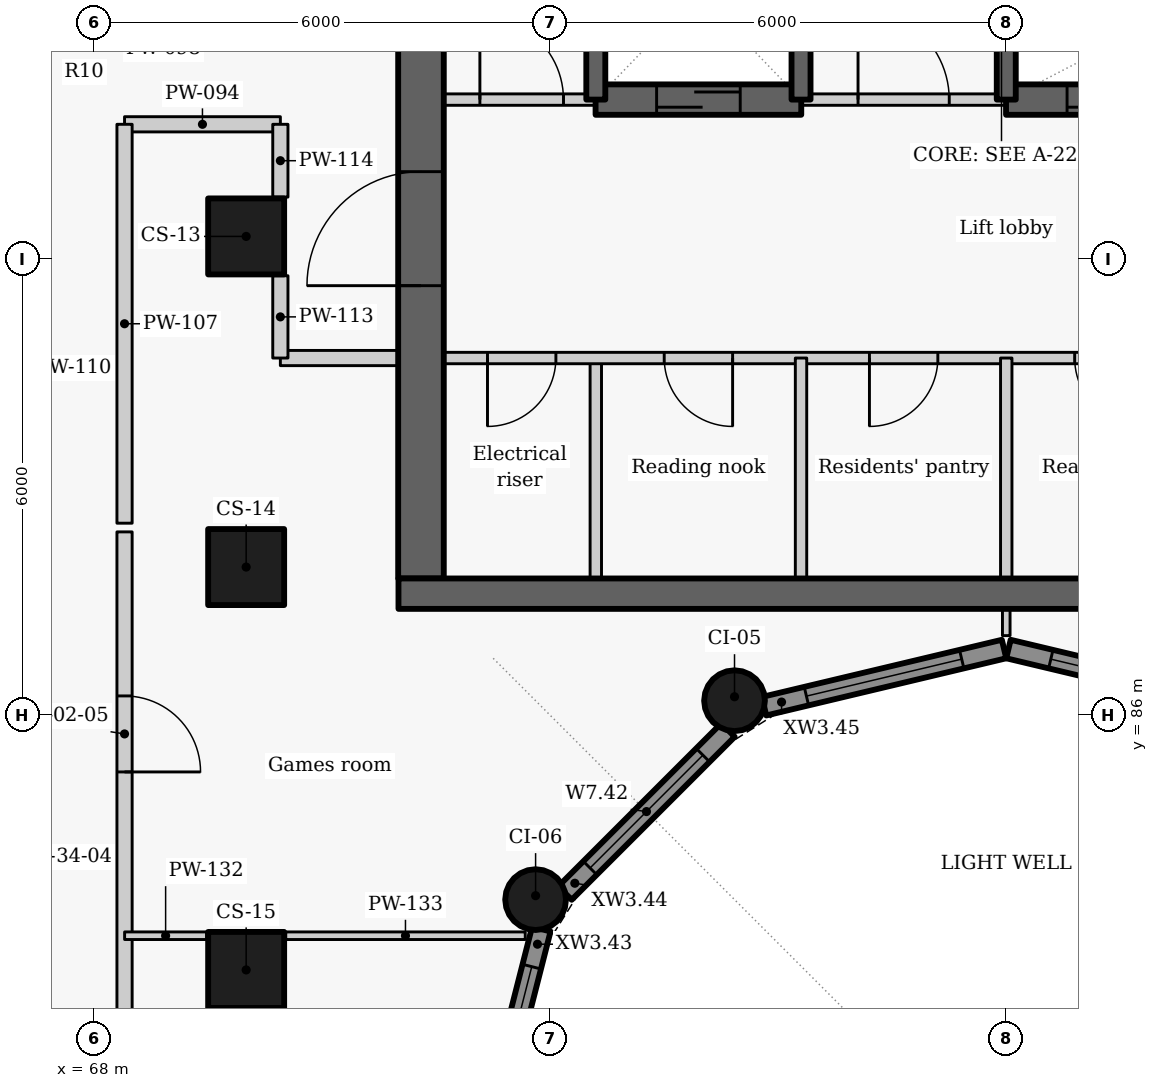
"""IFC4 building model, lengths in metres.
Left out: names, types, materials, properties, quantities, classifications, styles, units other than length and angle.
Written with IfcOpenShell. Run it as: python <this file> out.ifc"""

import sys

from ifc_helpers import new_model, si_unit, direction, frame, frame_2d, origin, origin_2d, place, context, subcontext, project, spatial, rectangle, circle, extrude, element, fill, save


model = new_model("IFC4")
c1 = context("Model", 3, precision=1e-05, world=origin(), true_north=direction((0.0, 1.0)))
c2 = subcontext(c1, "Body", "Model", "MODEL_VIEW")
j1 = project(units=[si_unit("LENGTHUNIT", "METRE"), si_unit("PLANEANGLEUNIT", "RADIAN")], contexts=[c1])
p1 = place(None, origin())
s1 = spatial("IfcSite", under=j1, at=p1, CompositionType="ELEMENT")
p2 = place(p1, origin())
s2 = spatial("IfcBuilding", under=s1, at=p2, CompositionType="ELEMENT")
p3 = place(p2, frame((0.0, 0.0, 166.8)))
s3 = spatial("IfcBuildingStorey", under=s2, at=p3, CompositionType="ELEMENT", Elevation=166.8)
for number, where, z_axis, x_axis in (
    (1, (70.0, 92.3, 0.0), (0.0, 0.0, 1.0), (0.0, -1.0, 0.0)),
    (2, (70.0, 87.95, 0.0), (0.0, 0.0, 1.0), (0.0, -1.0, 0.0)),
    (3, (70.0, 82.65, 0.0), (0.0, 0.0, 1.0), (0.0, -1.0, 0.0)),
):
    element("IfcColumn", number, at=place(p3, frame(where, z_axis=z_axis, x_axis=x_axis)), inside=s3, PredefinedType="COLUMN", context=c2, shape_type="SweptSolid", body=[
        extrude(rectangle(XDim=1.0, YDim=1.0, at=origin_2d()), origin(), (0.0, 0.0, 1.0), 3.3),
    ])
for number, where, z_axis, x_axis in (
    (4, (76.425, 86.192, 0.0), (0.0, 0.0, 1.0), (-0.866, -0.5, 0.0)),
    (5, (73.808, 83.575, 0.0), (0.0, 0.0, 1.0), (-0.5, -0.866, 0.0)),
):
    element("IfcColumn", number, at=place(p3, frame(where, z_axis=z_axis, x_axis=x_axis)), inside=s3, PredefinedType="COLUMN", context=c2, shape_type="SweptSolid", body=[
        extrude(circle(Radius=0.4, at=origin_2d()), origin(), (0.0, 0.0, 1.0), 3.3),
    ])
p4 = place(p3, frame((73.14, 80.27, 0.0), z_axis=(0.0, 0.0, 1.0), x_axis=(0.247055971283, 0.969001211069, 0.0)))
e6 = element("IfcWall", 6, at=p4, inside=s3, PredefinedType="SOLIDWALL", context=c2, shape_type="SweptSolid", body=[
    extrude(rectangle(XDim=3.01, YDim=0.25, at=frame_2d((1.505, 0.0))), origin(), (0.0, 0.0, 1.0), 2.05),
])
p5 = place(p4, frame((0.401, 0.0, 0.9)))
e7 = element("IfcOpeningElement", 7, at=p5, cuts=e6, PredefinedType="OPENING", context=c2, shape_type="SweptSolid", body=[
    extrude(rectangle(XDim=2.1, YDim=1.1, at=frame_2d((1.05, 0.55))), frame((0.0, 0.135, 0.0), z_axis=(0.0, -1.0, 0.0), x_axis=(1.0, 0.0, 0.0)), (0.0, 0.0, 1.0), 0.27),
])
p6 = place(p3, frame((74.194, 83.661, 0.0), z_axis=(0.0, 0.0, 1.0), x_axis=(0.707106781187, 0.707106781187, 0.0)))
e8 = element("IfcWall", 8, at=p6, inside=s3, PredefinedType="SOLIDWALL", context=c2, shape_type="SweptSolid", body=[
    extrude(rectangle(XDim=3.033, YDim=0.25, at=frame_2d((1.517, 0.0))), origin(), (0.0, 0.0, 1.0), 2.05),
])
p7 = place(p6, frame((0.467, 0.0, 0.9)))
e9 = element("IfcOpeningElement", 9, at=p7, cuts=e8, PredefinedType="OPENING", context=c2, shape_type="SweptSolid", body=[
    extrude(rectangle(XDim=2.1, YDim=1.1, at=frame_2d((1.05, 0.55))), frame((0.0, 0.135, 0.0), z_axis=(0.0, -1.0, 0.0), x_axis=(1.0, 0.0, 0.0)), (0.0, 0.0, 1.0), 0.27),
])
p8 = place(p3, frame((76.814, 86.119, 0.0), z_axis=(0.0, 0.0, 1.0), x_axis=(0.972773113459, 0.231759508395, 0.0)))
e10 = element("IfcWall", 10, at=p8, inside=s3, PredefinedType="SOLIDWALL", context=c2, shape_type="SweptSolid", body=[
    extrude(rectangle(XDim=3.246, YDim=0.25, at=frame_2d((1.623, 0.0))), origin(), (0.0, 0.0, 1.0), 2.05),
])
p9 = place(p8, frame((0.573, 0.0, 0.9)))
e11 = element("IfcOpeningElement", 11, at=p9, cuts=e10, PredefinedType="OPENING", context=c2, shape_type="SweptSolid", body=[
    extrude(rectangle(XDim=2.1, YDim=1.1, at=frame_2d((1.05, 0.55))), frame((0.0, 0.135, 0.0), z_axis=(0.0, -1.0, 0.0), x_axis=(1.0, 0.0, 0.0)), (0.0, 0.0, 1.0), 0.27),
])
p10 = place(p3, frame((80.029, 86.872, 0.0), z_axis=(0.0, 0.0, 1.0), x_axis=(0.972773113459, -0.231759508395, 0.0)))
e12 = element("IfcWall", 12, at=p10, inside=s3, PredefinedType="SOLIDWALL", context=c2, shape_type="SweptSolid", body=[
    extrude(rectangle(XDim=3.246, YDim=0.25, at=frame_2d((1.623, 0.0))), origin(), (0.0, 0.0, 1.0), 2.05),
])
p11 = place(p10, frame((0.573, 0.0, 0.9)))
e13 = element("IfcOpeningElement", 13, at=p11, cuts=e12, PredefinedType="OPENING", context=c2, shape_type="SweptSolid", body=[
    extrude(rectangle(XDim=2.1, YDim=1.1, at=frame_2d((1.05, 0.55))), frame((0.0, 0.135, 0.0), z_axis=(0.0, -1.0, 0.0), x_axis=(1.0, 0.0, 0.0)), (0.0, 0.0, 1.0), 0.27),
])
p12 = place(p3, frame((74.6, 87.8, 0.0), z_axis=(0.0, 0.0, 1.0), x_axis=(0.0, 1.0, 0.0)))
e14 = element("IfcWall", 14, at=p12, inside=s3, PredefinedType="PARTITIONING", context=c2, shape_type="SweptSolid", body=[
    extrude(rectangle(XDim=2.9, YDim=0.15, at=frame_2d((1.45, 0.0))), origin(), (0.0, 0.0, 1.0), 2.95),
])
p13 = place(p3, frame((85.4, 90.7, 0.0), z_axis=(0.0, 0.0, 1.0), x_axis=(-1.0, 0.0, 0.0)))
e15 = element("IfcWall", 15, at=p13, inside=s3, PredefinedType="PARTITIONING", context=c2, shape_type="SweptSolid", body=[
    extrude(rectangle(XDim=13.4, YDim=0.15, at=frame_2d((6.7, 0.0))), origin(), (0.0, 0.0, 1.0), 2.95),
])
p14 = place(p13, frame((11.325, 0.0, 0.0)))
e16 = element("IfcOpeningElement", 16, at=p14, cuts=e15, PredefinedType="OPENING", context=c2, shape_type="SweptSolid", body=[
    extrude(rectangle(XDim=0.9, YDim=2.1, at=frame_2d((0.45, 1.05))), frame((0.0, 0.085, 0.0), z_axis=(0.0, -1.0, 0.0), x_axis=(1.0, 0.0, 0.0)), (0.0, 0.0, 1.0), 0.17),
])
p15 = place(p13, frame((9.0, 0.0, 0.0)))
e17 = element("IfcOpeningElement", 17, at=p15, cuts=e15, PredefinedType="OPENING", context=c2, shape_type="SweptSolid", body=[
    extrude(rectangle(XDim=0.9, YDim=2.1, at=frame_2d((0.45, 1.05))), frame((0.0, 0.085, 0.0), z_axis=(0.0, -1.0, 0.0), x_axis=(1.0, 0.0, 0.0)), (0.0, 0.0, 1.0), 0.17),
])
p16 = place(p13, frame((6.3, 0.0, 0.0)))
e18 = element("IfcOpeningElement", 18, at=p16, cuts=e15, PredefinedType="OPENING", context=c2, shape_type="SweptSolid", body=[
    extrude(rectangle(XDim=0.9, YDim=2.1, at=frame_2d((0.45, 1.05))), frame((0.0, 0.085, 0.0), z_axis=(0.0, -1.0, 0.0), x_axis=(1.0, 0.0, 0.0)), (0.0, 0.0, 1.0), 0.17),
])
p17 = place(p13, frame((3.6, 0.0, 0.0)))
e19 = element("IfcOpeningElement", 19, at=p17, cuts=e15, PredefinedType="OPENING", context=c2, shape_type="SweptSolid", body=[
    extrude(rectangle(XDim=0.9, YDim=2.1, at=frame_2d((0.45, 1.05))), frame((0.0, 0.085, 0.0), z_axis=(0.0, -1.0, 0.0), x_axis=(1.0, 0.0, 0.0)), (0.0, 0.0, 1.0), 0.17),
])
p18 = place(p13, frame((0.9, 0.0, 0.0)))
e20 = element("IfcOpeningElement", 20, at=p18, cuts=e15, PredefinedType="OPENING", context=c2, shape_type="SweptSolid", body=[
    extrude(rectangle(XDim=0.9, YDim=2.1, at=frame_2d((0.45, 1.05))), frame((0.0, 0.085, 0.0), z_axis=(0.0, -1.0, 0.0), x_axis=(1.0, 0.0, 0.0)), (0.0, 0.0, 1.0), 0.17),
])
p19 = place(p3, frame((72.3, 87.8, -0.275), z_axis=(0.0, 0.0, 1.0), x_axis=(0.0, 1.0, 0.0)))
e21 = element("IfcWall", 21, at=p19, inside=s3, PredefinedType="SHEAR", context=c2, shape_type="SweptSolid", body=[
    extrude(rectangle(XDim=9.1, YDim=0.6, at=frame_2d((4.55, 0.0))), origin(), (0.0, 0.0, 1.0), 3.225),
])
p20 = place(p19, frame((3.852, 0.0, 0.275)))
e22 = element("IfcOpeningElement", 22, at=p20, cuts=e21, PredefinedType="OPENING", context=c2, shape_type="SweptSolid", body=[
    extrude(rectangle(XDim=1.5, YDim=2.1, at=frame_2d((0.75, 1.05))), frame((0.0, 0.31, 0.0), z_axis=(0.0, -1.0, 0.0), x_axis=(1.0, 0.0, 0.0)), (0.0, 0.0, 1.0), 0.62),
])
for number, where, z_axis, x_axis in (
    (23, (77.3, 87.8, 0.0), (0.0, 0.0, 1.0), (0.0, 1.0, 0.0)),
    (24, (80.0, 87.8, 0.0), (0.0, 0.0, 1.0), (0.0, 1.0, 0.0)),
):
    element("IfcWall", number, at=place(p3, frame(where, z_axis=z_axis, x_axis=x_axis)), inside=s3, PredefinedType="PARTITIONING", context=c2, shape_type="SweptSolid", body=[
        extrude(rectangle(XDim=2.9, YDim=0.15, at=frame_2d((1.45, 0.0))), origin(), (0.0, 0.0, 1.0), 2.95),
    ])
p21 = place(p3, frame((72.0, 94.1, 0.0), z_axis=(0.0, 0.0, 1.0), x_axis=(1.0, 0.0, 0.0)))
e25 = element("IfcWall", 25, at=p21, inside=s3, PredefinedType="PARTITIONING", context=c2, shape_type="SweptSolid", body=[
    extrude(rectangle(XDim=2.603, YDim=0.15, at=frame_2d((1.302, 0.0))), origin(), (0.0, 0.0, 1.0), 2.95),
])
p22 = place(p21, frame((1.075, 0.0, 0.0)))
e26 = element("IfcOpeningElement", 26, at=p22, cuts=e25, PredefinedType="OPENING", context=c2, shape_type="SweptSolid", body=[
    extrude(rectangle(XDim=1.1, YDim=2.1, at=frame_2d((0.55, 1.05))), frame((0.0, 0.085, 0.0), z_axis=(0.0, -1.0, 0.0), x_axis=(1.0, 0.0, 0.0)), (0.0, 0.0, 1.0), 0.17),
])
p23 = place(p3, frame((77.297, 94.1, 0.0), z_axis=(0.0, 0.0, 1.0), x_axis=(1.0, 0.0, 0.0)))
e27 = element("IfcWall", 27, at=p23, inside=s3, PredefinedType="PARTITIONING", context=c2, shape_type="SweptSolid", body=[
    extrude(rectangle(XDim=2.706, YDim=0.15, at=frame_2d((1.353, 0.0))), origin(), (0.0, 0.0, 1.0), 2.95),
])
p24 = place(p23, frame((0.753, 0.0, 0.0)))
e28 = element("IfcOpeningElement", 28, at=p24, cuts=e27, PredefinedType="OPENING", context=c2, shape_type="SweptSolid", body=[
    extrude(rectangle(XDim=1.2, YDim=2.1, at=frame_2d((0.6, 1.05))), frame((0.0, 0.085, 0.0), z_axis=(0.0, -1.0, 0.0), x_axis=(1.0, 0.0, 0.0)), (0.0, 0.0, 1.0), 0.17),
])
p25 = place(p3, frame((74.597, 94.1, -0.275), z_axis=(0.0, 0.0, 1.0), x_axis=(1.0, 0.0, 0.0)))
e29 = element("IfcWall", 29, at=p25, inside=s3, PredefinedType="SHEAR", context=c2, shape_type="SweptSolid", body=[
    extrude(rectangle(XDim=2.706, YDim=0.4, at=frame_2d((1.353, 0.0))), origin(), (0.0, 0.0, 1.0), 3.225),
])
p26 = place(p25, frame((0.803, 0.0, 0.275)))
e30 = element("IfcOpeningElement", 30, at=p26, cuts=e29, PredefinedType="OPENING", context=c2, shape_type="SweptSolid", body=[
    extrude(rectangle(XDim=1.1, YDim=2.1, at=frame_2d((0.55, 1.05))), frame((0.0, 0.21, 0.0), z_axis=(0.0, -1.0, 0.0), x_axis=(1.0, 0.0, 0.0)), (0.0, 0.0, 1.0), 0.42),
])
p27 = place(p3, frame((79.997, 94.1, -0.275), z_axis=(0.0, 0.0, 1.0), x_axis=(1.0, 0.0, 0.0)))
e31 = element("IfcWall", 31, at=p27, inside=s3, PredefinedType="SHEAR", context=c2, shape_type="SweptSolid", body=[
    extrude(rectangle(XDim=5.406, YDim=0.4, at=frame_2d((2.703, 0.0))), origin(), (0.0, 0.0, 1.0), 3.225),
])
p28 = place(p27, frame((0.803, 0.0, 0.275)))
e32 = element("IfcOpeningElement", 32, at=p28, cuts=e31, PredefinedType="OPENING", context=c2, shape_type="SweptSolid", body=[
    extrude(rectangle(XDim=1.1, YDim=2.1, at=frame_2d((0.55, 1.05))), frame((0.0, 0.21, 0.0), z_axis=(0.0, -1.0, 0.0), x_axis=(1.0, 0.0, 0.0)), (0.0, 0.0, 1.0), 0.42),
])
for number, where, z_axis, x_axis in (
    (33, (74.6, 94.1, -0.275), (0.0, 0.0, 1.0), (0.0, 1.0, 0.0)),
    (34, (77.3, 94.1, -0.275), (0.0, 0.0, 1.0), (0.0, 1.0, 0.0)),
    (35, (80.0, 94.1, -0.275), (0.0, 0.0, 1.0), (0.0, 1.0, 0.0)),
):
    element("IfcWall", number, at=place(p3, frame(where, z_axis=z_axis, x_axis=x_axis)), inside=s3, PredefinedType="SHEAR", context=c2, shape_type="SweptSolid", body=[
        extrude(rectangle(XDim=2.8, YDim=0.25, at=frame_2d((1.4, 0.0))), origin(), (0.0, 0.0, 1.0), 3.225),
    ])
p29 = place(p3, frame((68.4, 93.775, 0.0), z_axis=(0.0, 0.0, 1.0), x_axis=(1.0, 0.0, 0.0)))
e36 = element("IfcWall", 36, at=p29, inside=s3, PredefinedType="PARTITIONING", context=c2, shape_type="SweptSolid", body=[
    extrude(rectangle(XDim=2.05, YDim=0.2, at=frame_2d((1.025, 0.0))), origin(), (0.0, 0.0, 1.0), 2.43),
])
p30 = place(p3, frame((70.45, 90.7, 0.0), z_axis=(0.0, 0.0, 1.0), x_axis=(1.0, 0.0, 0.0)))
e37 = element("IfcWall", 37, at=p30, inside=s3, PredefinedType="PARTITIONING", context=c2, shape_type="SweptSolid", body=[
    extrude(rectangle(XDim=1.55, YDim=0.2, at=frame_2d((0.775, 0.0))), origin(), (0.0, 0.0, 1.0), 2.95),
])
p31 = place(p3, frame((68.4, 88.413, 0.0), z_axis=(0.0, 0.0, 1.0), x_axis=(0.0, -1.0, 0.0)))
e38 = element("IfcWall", 38, at=p31, inside=s3, PredefinedType="PARTITIONING", context=c2, shape_type="SweptSolid", body=[
    extrude(rectangle(XDim=10.486, YDim=0.2, at=frame_2d((5.243, 0.0))), origin(), (0.0, 0.0, 1.0), 2.95),
])
p32 = place(p31, frame((2.158, 0.0, 0.0)))
e39 = element("IfcOpeningElement", 39, at=p32, cuts=e38, PredefinedType="OPENING", context=c2, shape_type="SweptSolid", body=[
    extrude(rectangle(XDim=1.0, YDim=2.1, at=frame_2d((0.5, 1.05))), frame((0.0, 0.11, 0.0), z_axis=(0.0, -1.0, 0.0), x_axis=(1.0, 0.0, 0.0)), (0.0, 0.0, 1.0), 0.22),
])
p33 = place(p3, frame((68.4, 88.527, 0.0), z_axis=(0.0, 0.0, 1.0), x_axis=(0.0, 1.0, 0.0)))
e40 = element("IfcWall", 40, at=p33, inside=s3, PredefinedType="PARTITIONING", context=c2, shape_type="SweptSolid", body=[
    extrude(rectangle(XDim=5.248, YDim=0.2, at=frame_2d((2.624, 0.0))), origin(), (0.0, 0.0, 1.0), 2.95),
])
p34 = place(p3, frame((70.45, 90.7, 0.0), z_axis=(0.0, 0.0, 1.0), x_axis=(0.0, 1.0, 0.0)))
e41 = element("IfcWall", 41, at=p34, inside=s3, PredefinedType="PARTITIONING", context=c2, shape_type="SweptSolid", body=[
    extrude(rectangle(XDim=1.083, YDim=0.2, at=frame_2d((0.542, 0.0))), origin(), (0.0, 0.0, 1.0), 2.43),
])
p35 = place(p3, frame((70.45, 92.817, 0.0), z_axis=(0.0, 0.0, 1.0), x_axis=(0.0, 1.0, 0.0)))
e42 = element("IfcWall", 42, at=p35, inside=s3, PredefinedType="PARTITIONING", context=c2, shape_type="SweptSolid", body=[
    extrude(rectangle(XDim=0.958, YDim=0.2, at=frame_2d((0.479, 0.0))), origin(), (0.0, 0.0, 1.0), 2.95),
])
p36 = place(p3, frame((80.0, 87.048, 0.0), z_axis=(0.0, 0.0, 1.0), x_axis=(0.0, 1.0, 0.0)))
e43 = element("IfcWall", 43, at=p36, inside=s3, PredefinedType="PARTITIONING", context=c2, shape_type="SweptSolid", body=[
    extrude(rectangle(XDim=0.352, YDim=0.1, at=frame_2d((0.176, 0.0))), origin(), (0.0, 0.0, 1.0), 2.95),
])
p37 = place(p3, frame((68.401, 83.1, 0.0), z_axis=(0.0, 0.0, 1.0), x_axis=(1.0, 0.0, 0.0)))
e44 = element("IfcWall", 44, at=p37, inside=s3, PredefinedType="PARTITIONING", context=c2, shape_type="SweptSolid", body=[
    extrude(rectangle(XDim=1.079, YDim=0.1, at=frame_2d((0.54, 0.0))), origin(), (0.0, 0.0, 1.0), 2.95),
])
p38 = place(p3, frame((70.52, 83.1, 0.0), z_axis=(0.0, 0.0, 1.0), x_axis=(1.0, 0.0, 0.0)))
e45 = element("IfcWall", 45, at=p38, inside=s3, PredefinedType="PARTITIONING", context=c2, shape_type="SweptSolid", body=[
    extrude(rectangle(XDim=3.152, YDim=0.1, at=frame_2d((1.576, 0.0))), origin(), (0.0, 0.0, 1.0), 2.95),
])
p39 = place(p3, frame((72.004, 87.6, -0.275), z_axis=(0.0, 0.0, 1.0), x_axis=(1.0, 0.0, 0.0)))
e46 = element("IfcWall", 46, at=p39, inside=s3, PredefinedType="SHEAR", context=c2, shape_type="SweptSolid", body=[
    extrude(rectangle(XDim=15.992, YDim=0.4, at=frame_2d((7.996, 0.0))), origin(), (0.0, 0.0, 1.0), 3.225),
])
p40 = place(p5, origin())
e47 = element("IfcWindow", 47, at=p40, inside=s3, PartitioningType="SINGLE_PANEL", PredefinedType="WINDOW", context=c2, shape_type="SweptSolid", body=[
    extrude(rectangle(XDim=2.1, YDim=1.1, at=frame_2d((1.05, 0.55))), frame((0.0, 0.03, 0.0), z_axis=(0.0, -1.0, 0.0), x_axis=(1.0, 0.0, 0.0)), (0.0, 0.0, 1.0), 0.06),
])
fill(e7, e47)
p41 = place(p7, origin())
e48 = element("IfcWindow", 48, at=p41, inside=s3, PartitioningType="SINGLE_PANEL", PredefinedType="WINDOW", context=c2, shape_type="SweptSolid", body=[
    extrude(rectangle(XDim=2.1, YDim=1.1, at=frame_2d((1.05, 0.55))), frame((0.0, 0.03, 0.0), z_axis=(0.0, -1.0, 0.0), x_axis=(1.0, 0.0, 0.0)), (0.0, 0.0, 1.0), 0.06),
])
fill(e9, e48)
p42 = place(p9, origin())
e49 = element("IfcWindow", 49, at=p42, inside=s3, PartitioningType="SINGLE_PANEL", PredefinedType="WINDOW", context=c2, shape_type="SweptSolid", body=[
    extrude(rectangle(XDim=2.1, YDim=1.1, at=frame_2d((1.05, 0.55))), frame((0.0, 0.03, 0.0), z_axis=(0.0, -1.0, 0.0), x_axis=(1.0, 0.0, 0.0)), (0.0, 0.0, 1.0), 0.06),
])
fill(e11, e49)
p43 = place(p11, origin())
e50 = element("IfcWindow", 50, at=p43, inside=s3, PartitioningType="SINGLE_PANEL", PredefinedType="WINDOW", context=c2, shape_type="SweptSolid", body=[
    extrude(rectangle(XDim=2.1, YDim=1.1, at=frame_2d((1.05, 0.55))), frame((0.0, 0.03, 0.0), z_axis=(0.0, -1.0, 0.0), x_axis=(1.0, 0.0, 0.0)), (0.0, 0.0, 1.0), 0.06),
])
fill(e13, e50)
p44 = place(p14, origin())
e51 = element("IfcDoor", 51, at=p44, inside=s3, OperationType="SINGLE_SWING_RIGHT", PredefinedType="DOOR", context=c2, shape_type="SweptSolid", body=[
    extrude(rectangle(XDim=0.9, YDim=2.1, at=frame_2d((0.45, 1.05))), frame((0.0, 0.025, 0.0), z_axis=(0.0, -1.0, 0.0), x_axis=(1.0, 0.0, 0.0)), (0.0, 0.0, 1.0), 0.05),
])
fill(e16, e51)
p45 = place(p15, origin())
e52 = element("IfcDoor", 52, at=p45, inside=s3, OperationType="SINGLE_SWING_LEFT", PredefinedType="DOOR", context=c2, shape_type="SweptSolid", body=[
    extrude(rectangle(XDim=0.9, YDim=2.1, at=frame_2d((0.45, 1.05))), frame((0.0, 0.025, 0.0), z_axis=(0.0, -1.0, 0.0), x_axis=(1.0, 0.0, 0.0)), (0.0, 0.0, 1.0), 0.05),
])
fill(e17, e52)
p46 = place(p16, origin())
e53 = element("IfcDoor", 53, at=p46, inside=s3, OperationType="SINGLE_SWING_RIGHT", PredefinedType="DOOR", context=c2, shape_type="SweptSolid", body=[
    extrude(rectangle(XDim=0.9, YDim=2.1, at=frame_2d((0.45, 1.05))), frame((0.0, 0.025, 0.0), z_axis=(0.0, -1.0, 0.0), x_axis=(1.0, 0.0, 0.0)), (0.0, 0.0, 1.0), 0.05),
])
fill(e18, e53)
p47 = place(p17, origin())
e54 = element("IfcDoor", 54, at=p47, inside=s3, OperationType="SINGLE_SWING_LEFT", PredefinedType="DOOR", context=c2, shape_type="SweptSolid", body=[
    extrude(rectangle(XDim=0.9, YDim=2.1, at=frame_2d((0.45, 1.05))), frame((0.0, 0.025, 0.0), z_axis=(0.0, -1.0, 0.0), x_axis=(1.0, 0.0, 0.0)), (0.0, 0.0, 1.0), 0.05),
])
fill(e19, e54)
p48 = place(p22, origin())
e55 = element("IfcDoor", 55, at=p48, inside=s3, OperationType="SINGLE_SWING_LEFT", PredefinedType="DOOR", context=c2, shape_type="SweptSolid", body=[
    extrude(rectangle(XDim=1.1, YDim=2.1, at=frame_2d((0.55, 1.05))), frame((0.0, 0.025, 0.0), z_axis=(0.0, -1.0, 0.0), x_axis=(1.0, 0.0, 0.0)), (0.0, 0.0, 1.0), 0.05),
])
fill(e26, e55)
p49 = place(p26, origin())
e56 = element("IfcDoor", 56, at=p49, inside=s3, OperationType="SLIDING_TO_LEFT", PredefinedType="DOOR", context=c2, shape_type="SweptSolid", body=[
    extrude(rectangle(XDim=1.1, YDim=2.1, at=frame_2d((0.55, 1.05))), frame((0.0, 0.025, 0.0), z_axis=(0.0, -1.0, 0.0), x_axis=(1.0, 0.0, 0.0)), (0.0, 0.0, 1.0), 0.05),
])
fill(e30, e56)
p50 = place(p24, origin())
e57 = element("IfcDoor", 57, at=p50, inside=s3, OperationType="DOUBLE_DOOR_SINGLE_SWING", PredefinedType="DOOR", context=c2, shape_type="SweptSolid", body=[
    extrude(rectangle(XDim=1.2, YDim=2.1, at=frame_2d((0.6, 1.05))), frame((0.0, 0.025, 0.0), z_axis=(0.0, -1.0, 0.0), x_axis=(1.0, 0.0, 0.0)), (0.0, 0.0, 1.0), 0.05),
])
fill(e28, e57)
p51 = place(p28, origin())
e58 = element("IfcDoor", 58, at=p51, inside=s3, OperationType="SLIDING_TO_LEFT", PredefinedType="DOOR", context=c2, shape_type="SweptSolid", body=[
    extrude(rectangle(XDim=1.1, YDim=2.1, at=frame_2d((0.55, 1.05))), frame((0.0, 0.025, 0.0), z_axis=(0.0, -1.0, 0.0), x_axis=(1.0, 0.0, 0.0)), (0.0, 0.0, 1.0), 0.05),
])
fill(e32, e58)
p52 = place(p32, origin())
e59 = element("IfcDoor", 59, at=p52, inside=s3, OperationType="SINGLE_SWING_RIGHT", PredefinedType="DOOR", context=c2, shape_type="SweptSolid", body=[
    extrude(rectangle(XDim=1.0, YDim=2.1, at=frame_2d((0.5, 1.05))), frame((0.0, 0.025, 0.0), z_axis=(0.0, -1.0, 0.0), x_axis=(1.0, 0.0, 0.0)), (0.0, 0.0, 1.0), 0.05),
])
fill(e39, e59)
p53 = place(p20, origin())
e60 = element("IfcDoor", 60, at=p53, inside=s3, OperationType="DOUBLE_DOOR_SINGLE_SWING", PredefinedType="DOOR", context=c2, shape_type="SweptSolid", body=[
    extrude(rectangle(XDim=1.5, YDim=2.1, at=frame_2d((0.75, 1.05))), frame((0.0, 0.025, 0.0), z_axis=(0.0, -1.0, 0.0), x_axis=(1.0, 0.0, 0.0)), (0.0, 0.0, 1.0), 0.05),
])
fill(e22, e60)
save(model, sys.argv[1])
